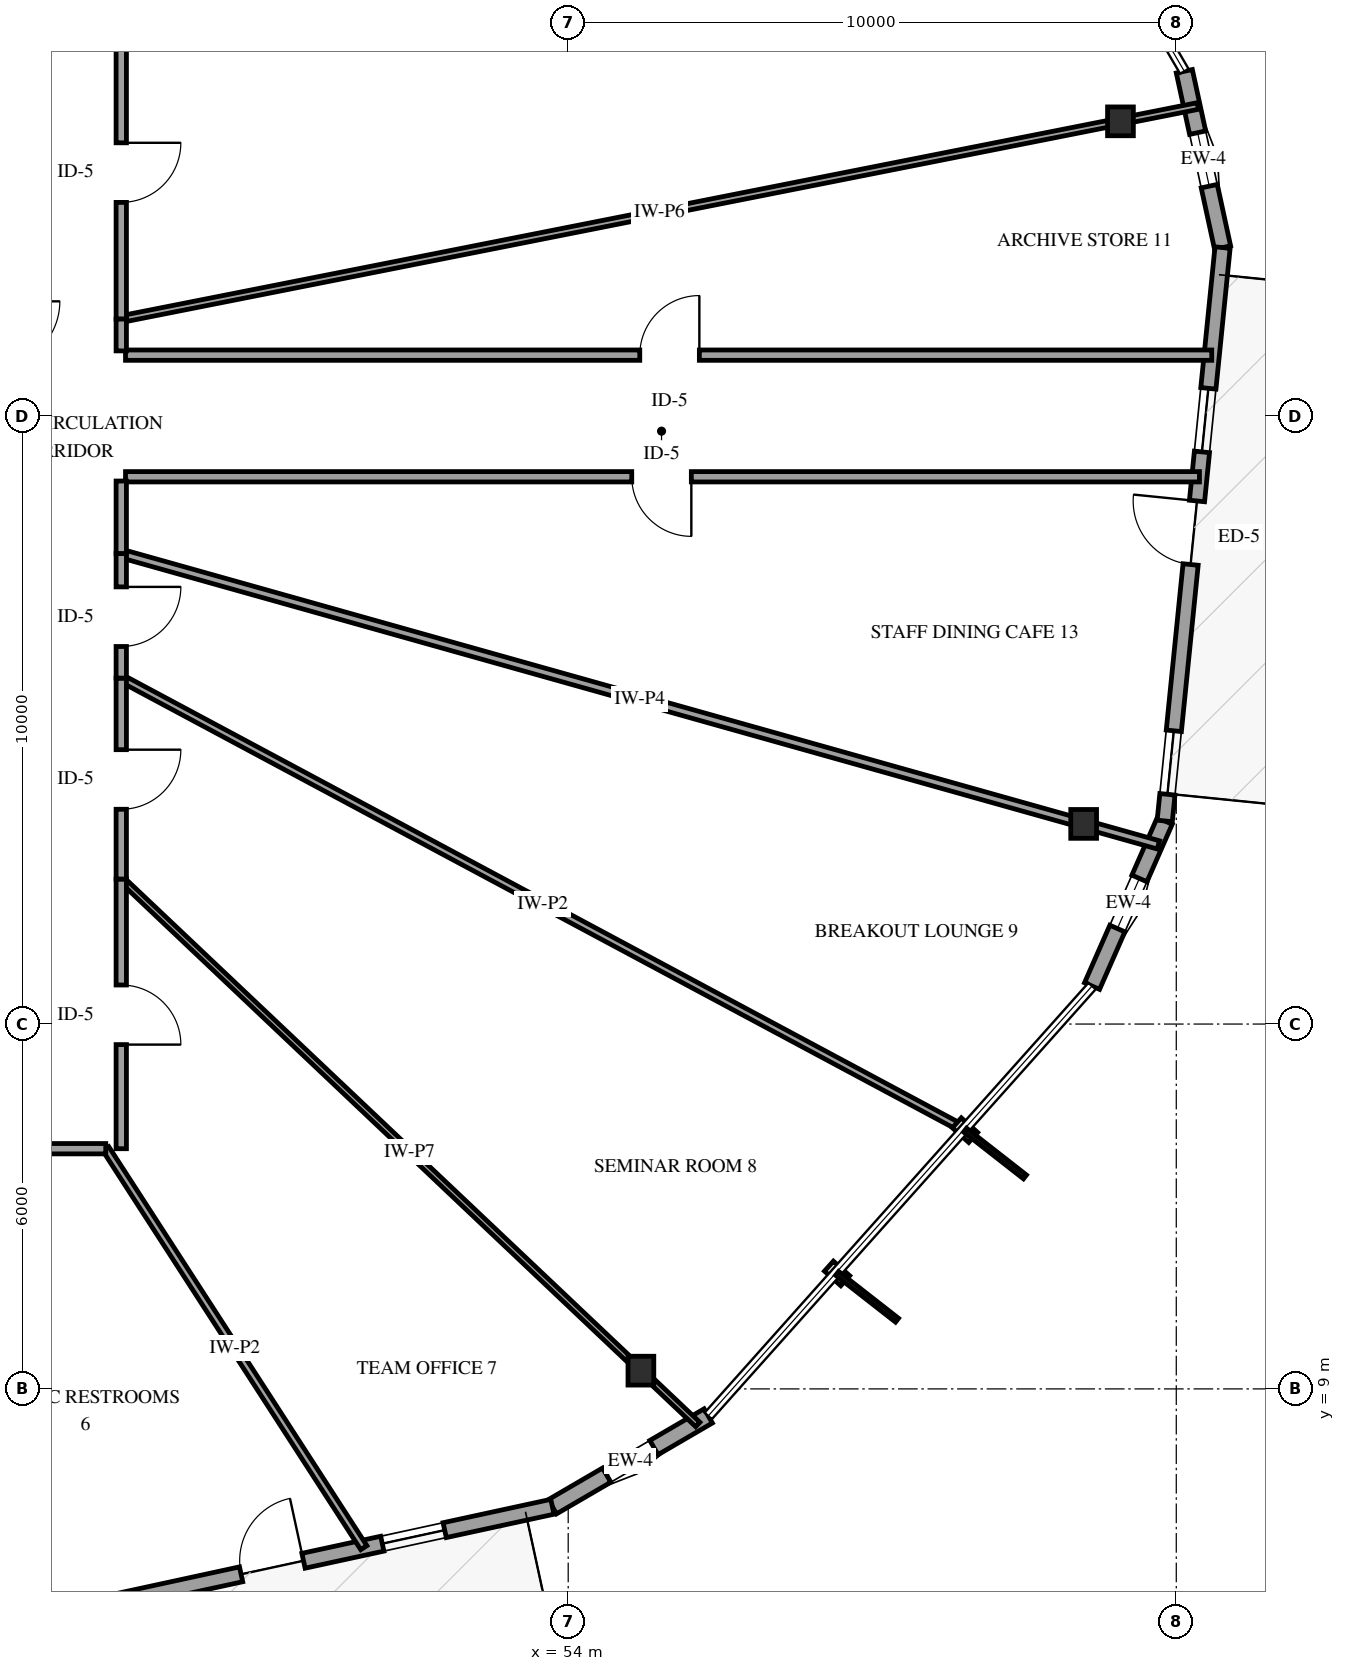
"""IFC4 building model, lengths in metres.
Left out: names, types, materials, properties, quantities, classifications, styles, units other than length and angle.
Written with IfcOpenShell. Run it as: python <this file> out.ifc"""

import sys

from ifc_helpers import new_model, si_unit, direction, frame, frame_2d, origin, origin_2d, place, context, subcontext, project, spatial, rectangle, i_section, extrude, element, fill, save


model = new_model("IFC4")
c1 = context("Model", 3, precision=1e-05, world=origin(), true_north=direction((0.0, 1.0)))
c2 = subcontext(c1, "Body", "Model", "MODEL_VIEW")
j1 = project(units=[si_unit("LENGTHUNIT", "METRE"), si_unit("PLANEANGLEUNIT", "RADIAN")], contexts=[c1])
p1 = place(None, origin())
s1 = spatial("IfcSite", under=j1, at=p1, CompositionType="ELEMENT")
p2 = place(p1, origin())
s2 = spatial("IfcBuilding", under=s1, at=p2, CompositionType="ELEMENT")
p3 = place(p2, frame((0.0, 0.0, 74.6)))
s3 = spatial("IfcBuildingStorey", under=s2, at=p3, CompositionType="ELEMENT", Elevation=74.6)
for number, where, z_axis, x_axis in (
    (1, (63.082, 29.845, 0.0), (0.0, 0.0, 1.0), (1.0, 0.0, 0.0)),
    (2, (55.196, 9.3, 0.0), (0.0, 0.0, 1.0), (1.0, 0.0, 0.0)),
    (3, (62.477, 18.292, 0.0), (0.0, 0.0, 1.0), (1.0, 0.0, 0.0)),
):
    element("IfcColumn", number, at=place(p3, frame(where, z_axis=z_axis, x_axis=x_axis)), inside=s3, PredefinedType="COLUMN", context=c2, shape_type="SweptSolid", body=[
        extrude(i_section(OverallWidth=0.424, OverallDepth=0.474, WebThickness=0.048, FlangeThickness=0.077, FilletRadius=0.038, at=origin_2d()), origin(), (0.0, 0.0, 1.0), 4.0),
    ])
p4 = place(p3, frame((53.74, 7.062, 0.0), z_axis=(0.0, 0.0, 1.0), x_axis=(0.863895290782, 0.503671447041, 0.0)))
e4 = element("IfcWall", 4, at=p4, inside=s3, PredefinedType="SOLIDWALL", context=c2, shape_type="SweptSolid", body=[
    extrude(rectangle(XDim=2.967, YDim=0.27, at=frame_2d((1.483, 0.0))), origin(), (0.0, 0.0, 1.0), 3.079),
])
p5 = place(p4, frame((1.033, 0.0, 0.75)))
e5 = element("IfcOpeningElement", 5, at=p5, cuts=e4, PredefinedType="OPENING", context=c2, shape_type="SweptSolid", body=[
    extrude(rectangle(XDim=0.9, YDim=1.5, at=frame_2d((0.45, 0.75))), frame((0.0, 0.145, 0.0), z_axis=(0.0, -1.0, 0.0), x_axis=(1.0, 0.0, 0.0)), (0.0, 0.0, 1.0), 0.29),
])
p6 = place(p3, frame((44.479, 5.052, 0.0), z_axis=(0.0, 0.0, 1.0), x_axis=(0.977271129169, 0.211993254829, 0.0)))
e6 = element("IfcWall", 6, at=p6, inside=s3, PredefinedType="SOLIDWALL", context=c2, shape_type="SweptSolid", body=[
    extrude(rectangle(XDim=9.477, YDim=0.25, at=frame_2d((4.738, 0.0))), origin(), (0.0, 0.0, 1.0), 3.079),
])
p7 = place(p6, frame((4.239, 0.0, 0.0)))
e7 = element("IfcOpeningElement", 7, at=p7, cuts=e6, PredefinedType="OPENING", context=c2, shape_type="SweptSolid", body=[
    extrude(rectangle(XDim=1.05, YDim=2.15, at=frame_2d((0.525, 1.075))), frame((0.0, 0.135, 0.0), z_axis=(0.0, -1.0, 0.0), x_axis=(1.0, 0.0, 0.0)), (0.0, 0.0, 1.0), 0.27),
])
p8 = place(p6, frame((0.44, 0.0, 0.72)))
e8 = element("IfcOpeningElement", 8, at=p8, cuts=e6, PredefinedType="OPENING", context=c2, shape_type="SweptSolid", body=[
    extrude(rectangle(XDim=1.05, YDim=1.55, at=frame_2d((0.525, 0.775))), frame((0.0, 0.135, 0.0), z_axis=(0.0, -1.0, 0.0), x_axis=(1.0, 0.0, 0.0)), (0.0, 0.0, 1.0), 0.27),
])
p9 = place(p6, frame((6.615, 0.0, 0.72)))
e9 = element("IfcOpeningElement", 9, at=p9, cuts=e6, PredefinedType="OPENING", context=c2, shape_type="SweptSolid", body=[
    extrude(rectangle(XDim=1.05, YDim=1.55, at=frame_2d((0.525, 0.775))), frame((0.0, 0.135, 0.0), z_axis=(0.0, -1.0, 0.0), x_axis=(1.0, 0.0, 0.0)), (0.0, 0.0, 1.0), 0.27),
])
p10 = place(p3, frame((62.615, 15.625, 0.0), z_axis=(0.0, 0.0, 1.0), x_axis=(0.402859965055, 0.915261628473, 0.0)))
e10 = element("IfcWall", 10, at=p10, inside=s3, PredefinedType="SOLIDWALL", context=c2, shape_type="SweptSolid", body=[
    extrude(rectangle(XDim=2.967, YDim=0.27, at=frame_2d((1.483, 0.0))), origin(), (0.0, 0.0, 1.0), 3.079),
])
p11 = place(p10, frame((1.033, 0.0, 0.75)))
e11 = element("IfcOpeningElement", 11, at=p11, cuts=e10, PredefinedType="OPENING", context=c2, shape_type="SweptSolid", body=[
    extrude(rectangle(XDim=0.9, YDim=1.5, at=frame_2d((0.45, 0.75))), frame((0.0, 0.145, 0.0), z_axis=(0.0, -1.0, 0.0), x_axis=(1.0, 0.0, 0.0)), (0.0, 0.0, 1.0), 0.29),
])
p12 = place(p3, frame((64.761, 27.769, 0.0), z_axis=(0.0, 0.0, 1.0), x_axis=(-0.212012761333, 0.977266897542, 0.0)))
e12 = element("IfcWall", 12, at=p12, inside=s3, PredefinedType="SOLIDWALL", context=c2, shape_type="SweptSolid", body=[
    extrude(rectangle(XDim=2.966, YDim=0.27, at=frame_2d((1.483, 0.0))), origin(), (0.0, 0.0, 1.0), 3.079),
])
p13 = place(p12, frame((1.033, 0.0, 0.75)))
e13 = element("IfcOpeningElement", 13, at=p13, cuts=e12, PredefinedType="OPENING", context=c2, shape_type="SweptSolid", body=[
    extrude(rectangle(XDim=0.9, YDim=1.5, at=frame_2d((0.45, 0.75))), frame((0.0, 0.145, 0.0), z_axis=(0.0, -1.0, 0.0), x_axis=(1.0, 0.0, 0.0)), (0.0, 0.0, 1.0), 0.29),
])
p14 = place(p3, frame((63.81, 18.34, 0.0), z_axis=(0.0, 0.0, 1.0), x_axis=(0.100365790493, 0.994950605859, 0.0)))
e14 = element("IfcWall", 14, at=p14, inside=s3, PredefinedType="SOLIDWALL", context=c2, shape_type="SweptSolid", body=[
    extrude(rectangle(XDim=9.477, YDim=0.25, at=frame_2d((4.739, 0.0))), origin(), (0.0, 0.0, 1.0), 3.079),
])
p15 = place(p14, frame((4.239, 0.0, 0.0)))
e15 = element("IfcOpeningElement", 15, at=p15, cuts=e14, PredefinedType="OPENING", context=c2, shape_type="SweptSolid", body=[
    extrude(rectangle(XDim=1.05, YDim=2.15, at=frame_2d((0.525, 1.075))), frame((0.0, 0.135, 0.0), z_axis=(0.0, -1.0, 0.0), x_axis=(1.0, 0.0, 0.0)), (0.0, 0.0, 1.0), 0.27),
])
p16 = place(p14, frame((0.44, 0.0, 0.72)))
e16 = element("IfcOpeningElement", 16, at=p16, cuts=e14, PredefinedType="OPENING", context=c2, shape_type="SweptSolid", body=[
    extrude(rectangle(XDim=1.05, YDim=1.55, at=frame_2d((0.525, 0.775))), frame((0.0, 0.135, 0.0), z_axis=(0.0, -1.0, 0.0), x_axis=(1.0, 0.0, 0.0)), (0.0, 0.0, 1.0), 0.27),
])
p17 = place(p14, frame((6.1, 0.0, 0.72)))
e17 = element("IfcOpeningElement", 17, at=p17, cuts=e14, PredefinedType="OPENING", context=c2, shape_type="SweptSolid", body=[
    extrude(rectangle(XDim=1.05, YDim=1.55, at=frame_2d((0.525, 0.775))), frame((0.0, 0.135, 0.0), z_axis=(0.0, -1.0, 0.0), x_axis=(1.0, 0.0, 0.0)), (0.0, 0.0, 1.0), 0.27),
])
p18 = place(p3, frame((46.65, 26.593, 0.0), z_axis=(0.0, 0.0, 1.0), x_axis=(0.980974085713, 0.194138721431, 0.0)))
e18 = element("IfcWall", 18, at=p18, inside=s3, PredefinedType="PARTITIONING", context=c2, shape_type="SweptSolid", body=[
    extrude(rectangle(XDim=18.049, YDim=0.11, at=frame_2d((9.024, 0.0))), origin(), (0.0, 0.0, 1.0), 2.995),
])
p19 = place(p3, frame((46.72, 26.0, 0.0), z_axis=(0.0, 0.0, 1.0), x_axis=(1.0, 0.0, 0.0)))
e19 = element("IfcWall", 19, at=p19, inside=s3, PredefinedType="PARTITIONING", context=c2, shape_type="SweptSolid", body=[
    extrude(rectangle(XDim=17.863, YDim=0.17, at=frame_2d((8.932, 0.0))), origin(), (0.0, 0.0, 1.0), 3.7),
])
p20 = place(p19, frame((8.457, 0.0, 0.0)))
e20 = element("IfcOpeningElement", 20, at=p20, cuts=e19, PredefinedType="OPENING", context=c2, shape_type="SweptSolid", body=[
    extrude(rectangle(XDim=0.98, YDim=2.15, at=frame_2d((0.49, 1.075))), frame((0.0, 0.095, 0.0), z_axis=(0.0, -1.0, 0.0), x_axis=(1.0, 0.0, 0.0)), (0.0, 0.0, 1.0), 0.19),
])
p21 = place(p3, frame((46.65, 22.738, 0.0), z_axis=(0.0, 0.0, 1.0), x_axis=(0.96272520574, -0.270481382415, 0.0)))
e21 = element("IfcWall", 21, at=p21, inside=s3, PredefinedType="PARTITIONING", context=c2, shape_type="SweptSolid", body=[
    extrude(rectangle(XDim=17.717, YDim=0.14, at=frame_2d((8.858, 0.0))), origin(), (0.0, 0.0, 1.0), 2.995),
])
p22 = place(p3, frame((64.381, 24.0, 0.0), z_axis=(0.0, 0.0, 1.0), x_axis=(-1.0, 0.0, 0.0)))
e22 = element("IfcWall", 22, at=p22, inside=s3, PredefinedType="PARTITIONING", context=c2, shape_type="SweptSolid", body=[
    extrude(rectangle(XDim=17.661, YDim=0.17, at=frame_2d((8.831, 0.0))), origin(), (0.0, 0.0, 1.0), 3.7),
])
p23 = place(p22, frame((8.356, 0.0, 0.0)))
e23 = element("IfcOpeningElement", 23, at=p23, cuts=e22, PredefinedType="OPENING", context=c2, shape_type="SweptSolid", body=[
    extrude(rectangle(XDim=0.98, YDim=2.15, at=frame_2d((0.49, 1.075))), frame((0.0, 0.095, 0.0), z_axis=(0.0, -1.0, 0.0), x_axis=(1.0, 0.0, 0.0)), (0.0, 0.0, 1.0), 0.19),
])
p24 = place(p3, frame((46.65, 20.689, 0.0), z_axis=(0.0, 0.0, 1.0), x_axis=(0.881603902275, -0.471989999358, 0.0)))
e24 = element("IfcWall", 24, at=p24, inside=s3, PredefinedType="PARTITIONING", context=c2, shape_type="SweptSolid", body=[
    extrude(rectangle(XDim=15.723, YDim=0.12, at=frame_2d((7.861, 0.0))), origin(), (0.0, 0.0, 1.0), 3.7),
])
p25 = place(p3, frame((46.65, 17.385, 0.0), z_axis=(0.0, 0.0, 1.0), x_axis=(0.726419957341, -0.687251078993, 0.0)))
e25 = element("IfcWall", 25, at=p25, inside=s3, PredefinedType="PARTITIONING", context=c2, shape_type="SweptSolid", body=[
    extrude(rectangle(XDim=13.052, YDim=0.1, at=frame_2d((6.526, 0.0))), origin(), (0.0, 0.0, 1.0), 2.995),
])
p26 = place(p3, frame((46.395, 12.95, 0.0), z_axis=(0.0, 0.0, 1.0), x_axis=(0.543117835723, -0.839656487213, 0.0)))
e26 = element("IfcWall", 26, at=p26, inside=s3, PredefinedType="PARTITIONING", context=c2, shape_type="SweptSolid", body=[
    extrude(rectangle(XDim=7.814, YDim=0.12, at=frame_2d((3.907, 0.0))), origin(), (0.0, 0.0, 1.0), 3.7),
])
p27 = place(p3, frame((46.65, 31.442, 0.0), z_axis=(0.0, 0.0, 1.0), x_axis=(0.0, -1.0, 0.0)))
e27 = element("IfcWall", 27, at=p27, inside=s3, PredefinedType="PARTITIONING", context=c2, shape_type="SweptSolid", body=[
    extrude(rectangle(XDim=4.849, YDim=0.17, at=frame_2d((2.424, 0.0))), origin(), (0.0, 0.0, 1.0), 3.7),
])
p28 = place(p27, frame((1.95, 0.0, 0.0)))
e28 = element("IfcOpeningElement", 28, at=p28, cuts=e27, PredefinedType="OPENING", context=c2, shape_type="SweptSolid", body=[
    extrude(rectangle(XDim=0.98, YDim=2.15, at=frame_2d((0.49, 1.075))), frame((0.0, 0.095, 0.0), z_axis=(0.0, -1.0, 0.0), x_axis=(1.0, 0.0, 0.0)), (0.0, 0.0, 1.0), 0.19),
])
p29 = place(p3, frame((46.65, 17.385, 0.0), z_axis=(0.0, 0.0, 1.0), x_axis=(0.0, -1.0, 0.0)))
e29 = element("IfcWall", 29, at=p29, inside=s3, PredefinedType="PARTITIONING", context=c2, shape_type="SweptSolid", body=[
    extrude(rectangle(XDim=4.435, YDim=0.17, at=frame_2d((2.218, 0.0))), origin(), (0.0, 0.0, 1.0), 3.7),
])
p30 = place(p29, frame((1.743, 0.0, 0.0)))
e30 = element("IfcOpeningElement", 30, at=p30, cuts=e29, PredefinedType="OPENING", context=c2, shape_type="SweptSolid", body=[
    extrude(rectangle(XDim=0.98, YDim=2.15, at=frame_2d((0.49, 1.075))), frame((0.0, 0.095, 0.0), z_axis=(0.0, -1.0, 0.0), x_axis=(1.0, 0.0, 0.0)), (0.0, 0.0, 1.0), 0.19),
])
p31 = place(p3, frame((46.395, 12.95, 0.0), z_axis=(0.0, 0.0, 1.0), x_axis=(-1.0, 0.0, 0.0)))
e31 = element("IfcWall", 31, at=p31, inside=s3, PredefinedType="PARTITIONING", context=c2, shape_type="SweptSolid", body=[
    extrude(rectangle(XDim=4.301, YDim=0.17, at=frame_2d((2.15, 0.0))), origin(), (0.0, 0.0, 1.0), 3.7),
])
p32 = place(p31, frame((1.676, 0.0, 0.0)))
e32 = element("IfcOpeningElement", 32, at=p32, cuts=e31, PredefinedType="OPENING", context=c2, shape_type="SweptSolid", body=[
    extrude(rectangle(XDim=0.98, YDim=2.15, at=frame_2d((0.49, 1.075))), frame((0.0, 0.095, 0.0), z_axis=(0.0, -1.0, 0.0), x_axis=(1.0, 0.0, 0.0)), (0.0, 0.0, 1.0), 0.19),
])
p33 = place(p3, frame((46.65, 20.689, 0.0), z_axis=(0.0, 0.0, 1.0), x_axis=(0.0, -1.0, 0.0)))
e33 = element("IfcWall", 33, at=p33, inside=s3, PredefinedType="PARTITIONING", context=c2, shape_type="SweptSolid", body=[
    extrude(rectangle(XDim=3.304, YDim=0.17, at=frame_2d((1.652, 0.0))), origin(), (0.0, 0.0, 1.0), 3.7),
])
p34 = place(p33, frame((1.177, 0.0, 0.0)))
e34 = element("IfcOpeningElement", 34, at=p34, cuts=e33, PredefinedType="OPENING", context=c2, shape_type="SweptSolid", body=[
    extrude(rectangle(XDim=0.98, YDim=2.15, at=frame_2d((0.49, 1.075))), frame((0.0, 0.095, 0.0), z_axis=(0.0, -1.0, 0.0), x_axis=(1.0, 0.0, 0.0)), (0.0, 0.0, 1.0), 0.19),
])
p35 = place(p3, frame((46.65, 22.738, 0.0), z_axis=(0.0, 0.0, 1.0), x_axis=(0.0, -1.0, 0.0)))
e35 = element("IfcWall", 35, at=p35, inside=s3, PredefinedType="PARTITIONING", context=c2, shape_type="SweptSolid", body=[
    extrude(rectangle(XDim=2.049, YDim=0.17, at=frame_2d((1.024, 0.0))), origin(), (0.0, 0.0, 1.0), 3.7),
])
p36 = place(p35, frame((0.549, 0.0, 0.0)))
e36 = element("IfcOpeningElement", 36, at=p36, cuts=e35, PredefinedType="OPENING", context=c2, shape_type="SweptSolid", body=[
    extrude(rectangle(XDim=0.98, YDim=2.15, at=frame_2d((0.49, 1.075))), frame((0.0, 0.095, 0.0), z_axis=(0.0, -1.0, 0.0), x_axis=(1.0, 0.0, 0.0)), (0.0, 0.0, 1.0), 0.19),
])
p37 = place(p3, frame((46.65, 23.93, 0.0), z_axis=(0.0, 0.0, 1.0), x_axis=(0.0, -1.0, 0.0)))
e37 = element("IfcWall", 37, at=p37, inside=s3, PredefinedType="PARTITIONING", context=c2, shape_type="SweptSolid", body=[
    extrude(rectangle(XDim=1.192, YDim=0.17, at=frame_2d((0.596, 0.0))), origin(), (0.0, 0.0, 1.0), 3.7),
])
p38 = place(p3, frame((46.65, 26.593, 0.0), z_axis=(0.0, 0.0, 1.0), x_axis=(0.0, -1.0, 0.0)))
e38 = element("IfcWall", 38, at=p38, inside=s3, PredefinedType="PARTITIONING", context=c2, shape_type="SweptSolid", body=[
    extrude(rectangle(XDim=0.523, YDim=0.17, at=frame_2d((0.261, 0.0))), origin(), (0.0, 0.0, 1.0), 3.7),
])
p39 = place(p5, origin())
e39 = element("IfcWindow", 39, at=p39, inside=s3, PartitioningType="SINGLE_PANEL", PredefinedType="WINDOW", context=c2, shape_type="SweptSolid", body=[
    extrude(rectangle(XDim=0.9, YDim=1.5, at=frame_2d((0.45, 0.75))), frame((0.0, 0.03, 0.0), z_axis=(0.0, -1.0, 0.0), x_axis=(1.0, 0.0, 0.0)), (0.0, 0.0, 1.0), 0.06),
])
fill(e5, e39)
p40 = place(p7, origin())
e40 = element("IfcDoor", 40, at=p40, inside=s3, OperationType="SINGLE_SWING_RIGHT", PredefinedType="DOOR", context=c2, shape_type="SweptSolid", body=[
    extrude(rectangle(XDim=1.05, YDim=2.15, at=frame_2d((0.525, 1.075))), frame((0.0, 0.025, 0.0), z_axis=(0.0, -1.0, 0.0), x_axis=(1.0, 0.0, 0.0)), (0.0, 0.0, 1.0), 0.05),
])
fill(e7, e40)
p41 = place(p9, origin())
e41 = element("IfcWindow", 41, at=p41, inside=s3, PartitioningType="SINGLE_PANEL", PredefinedType="WINDOW", context=c2, shape_type="SweptSolid", body=[
    extrude(rectangle(XDim=1.05, YDim=1.55, at=frame_2d((0.525, 0.775))), frame((0.0, 0.03, 0.0), z_axis=(0.0, -1.0, 0.0), x_axis=(1.0, 0.0, 0.0)), (0.0, 0.0, 1.0), 0.06),
])
fill(e9, e41)
p42 = place(p11, origin())
e42 = element("IfcWindow", 42, at=p42, inside=s3, PartitioningType="SINGLE_PANEL", PredefinedType="WINDOW", context=c2, shape_type="SweptSolid", body=[
    extrude(rectangle(XDim=0.9, YDim=1.5, at=frame_2d((0.45, 0.75))), frame((0.0, 0.03, 0.0), z_axis=(0.0, -1.0, 0.0), x_axis=(1.0, 0.0, 0.0)), (0.0, 0.0, 1.0), 0.06),
])
fill(e11, e42)
p43 = place(p13, origin())
e43 = element("IfcWindow", 43, at=p43, inside=s3, PartitioningType="SINGLE_PANEL", PredefinedType="WINDOW", context=c2, shape_type="SweptSolid", body=[
    extrude(rectangle(XDim=0.9, YDim=1.5, at=frame_2d((0.45, 0.75))), frame((0.0, 0.03, 0.0), z_axis=(0.0, -1.0, 0.0), x_axis=(1.0, 0.0, 0.0)), (0.0, 0.0, 1.0), 0.06),
])
fill(e13, e43)
p44 = place(p15, origin())
e44 = element("IfcDoor", 44, at=p44, inside=s3, OperationType="SINGLE_SWING_RIGHT", PredefinedType="DOOR", context=c2, shape_type="SweptSolid", body=[
    extrude(rectangle(XDim=1.05, YDim=2.15, at=frame_2d((0.525, 1.075))), frame((0.0, 0.025, 0.0), z_axis=(0.0, -1.0, 0.0), x_axis=(1.0, 0.0, 0.0)), (0.0, 0.0, 1.0), 0.05),
])
fill(e15, e44)
p45 = place(p16, origin())
e45 = element("IfcWindow", 45, at=p45, inside=s3, PartitioningType="SINGLE_PANEL", PredefinedType="WINDOW", context=c2, shape_type="SweptSolid", body=[
    extrude(rectangle(XDim=1.05, YDim=1.55, at=frame_2d((0.525, 0.775))), frame((0.0, 0.03, 0.0), z_axis=(0.0, -1.0, 0.0), x_axis=(1.0, 0.0, 0.0)), (0.0, 0.0, 1.0), 0.06),
])
fill(e16, e45)
p46 = place(p17, origin())
e46 = element("IfcWindow", 46, at=p46, inside=s3, PartitioningType="SINGLE_PANEL", PredefinedType="WINDOW", context=c2, shape_type="SweptSolid", body=[
    extrude(rectangle(XDim=1.05, YDim=1.55, at=frame_2d((0.525, 0.775))), frame((0.0, 0.03, 0.0), z_axis=(0.0, -1.0, 0.0), x_axis=(1.0, 0.0, 0.0)), (0.0, 0.0, 1.0), 0.06),
])
fill(e17, e46)
p47 = place(p20, origin())
e47 = element("IfcDoor", 47, at=p47, inside=s3, OperationType="SINGLE_SWING_RIGHT", PredefinedType="DOOR", context=c2, shape_type="SweptSolid", body=[
    extrude(rectangle(XDim=0.98, YDim=2.15, at=frame_2d((0.49, 1.075))), frame((0.0, 0.025, 0.0), z_axis=(0.0, -1.0, 0.0), x_axis=(1.0, 0.0, 0.0)), (0.0, 0.0, 1.0), 0.05),
])
fill(e20, e47)
p48 = place(p23, origin())
e48 = element("IfcDoor", 48, at=p48, inside=s3, OperationType="SINGLE_SWING_LEFT", PredefinedType="DOOR", context=c2, shape_type="SweptSolid", body=[
    extrude(rectangle(XDim=0.98, YDim=2.15, at=frame_2d((0.49, 1.075))), frame((0.0, 0.025, 0.0), z_axis=(0.0, -1.0, 0.0), x_axis=(1.0, 0.0, 0.0)), (0.0, 0.0, 1.0), 0.05),
])
fill(e23, e48)
p49 = place(p28, origin())
e49 = element("IfcDoor", 49, at=p49, inside=s3, OperationType="SINGLE_SWING_LEFT", PredefinedType="DOOR", context=c2, shape_type="SweptSolid", body=[
    extrude(rectangle(XDim=0.98, YDim=2.15, at=frame_2d((0.49, 1.075))), frame((0.0, 0.025, 0.0), z_axis=(0.0, -1.0, 0.0), x_axis=(1.0, 0.0, 0.0)), (0.0, 0.0, 1.0), 0.05),
])
fill(e28, e49)
p50 = place(p30, origin())
e50 = element("IfcDoor", 50, at=p50, inside=s3, OperationType="SINGLE_SWING_RIGHT", PredefinedType="DOOR", context=c2, shape_type="SweptSolid", body=[
    extrude(rectangle(XDim=0.98, YDim=2.15, at=frame_2d((0.49, 1.075))), frame((0.0, 0.025, 0.0), z_axis=(0.0, -1.0, 0.0), x_axis=(1.0, 0.0, 0.0)), (0.0, 0.0, 1.0), 0.05),
])
fill(e30, e50)
p51 = place(p34, origin())
e51 = element("IfcDoor", 51, at=p51, inside=s3, OperationType="SINGLE_SWING_LEFT", PredefinedType="DOOR", context=c2, shape_type="SweptSolid", body=[
    extrude(rectangle(XDim=0.98, YDim=2.15, at=frame_2d((0.49, 1.075))), frame((0.0, 0.025, 0.0), z_axis=(0.0, -1.0, 0.0), x_axis=(1.0, 0.0, 0.0)), (0.0, 0.0, 1.0), 0.05),
])
fill(e34, e51)
p52 = place(p36, origin())
e52 = element("IfcDoor", 52, at=p52, inside=s3, OperationType="SINGLE_SWING_LEFT", PredefinedType="DOOR", context=c2, shape_type="SweptSolid", body=[
    extrude(rectangle(XDim=0.98, YDim=2.15, at=frame_2d((0.49, 1.075))), frame((0.0, 0.025, 0.0), z_axis=(0.0, -1.0, 0.0), x_axis=(1.0, 0.0, 0.0)), (0.0, 0.0, 1.0), 0.05),
])
fill(e36, e52)
save(model, sys.argv[1])
